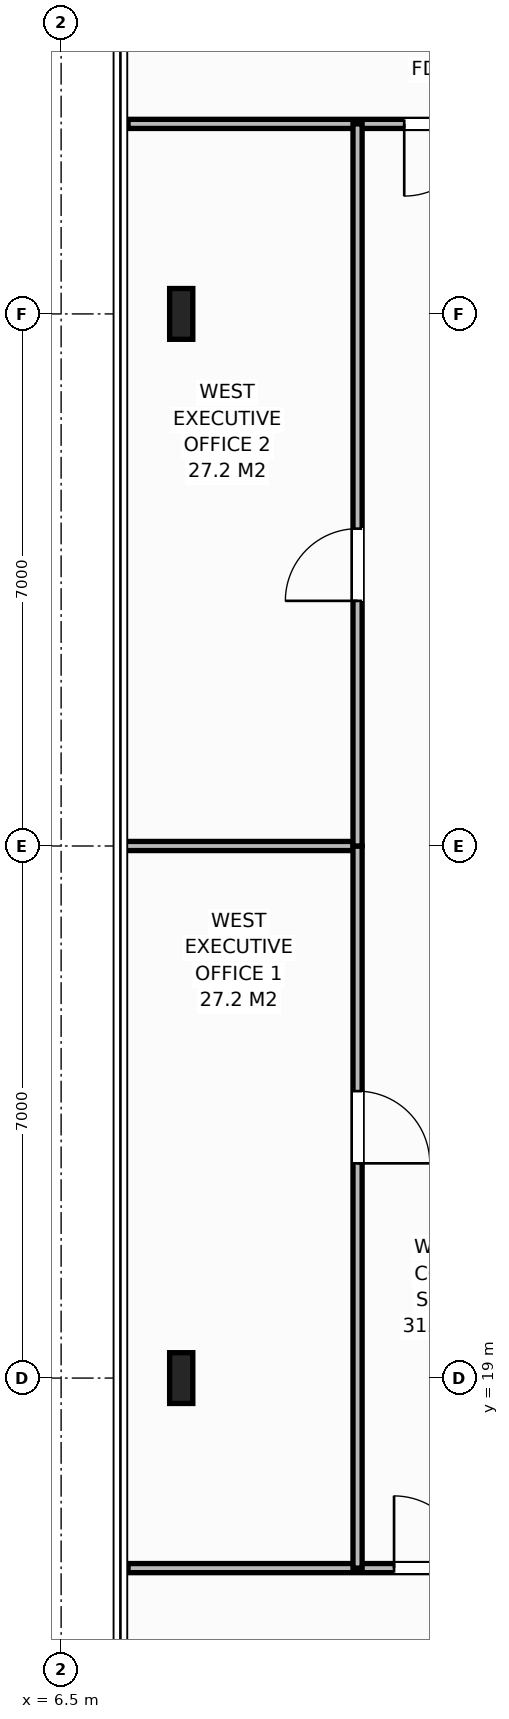
"""IFC4 building model, lengths in metres.
Left out: names, types, materials, properties, quantities, classifications, styles, units other than length and angle.
Written with IfcOpenShell. Run it as: python <this file> out.ifc"""

import sys

from ifc_helpers import new_model, si_unit, direction, frame, frame_2d, origin, origin_2d, place, context, subcontext, project, spatial, rectangle, i_section, extrude, element, fill, save


model = new_model("IFC4")
c1 = context("Model", 3, precision=1e-05, world=origin(), true_north=direction((0.0, 1.0)))
c2 = subcontext(c1, "Body", "Model", "MODEL_VIEW")
j1 = project(units=[si_unit("LENGTHUNIT", "METRE"), si_unit("PLANEANGLEUNIT", "RADIAN")], contexts=[c1])
p1 = place(None, origin())
s1 = spatial("IfcSite", under=j1, at=p1, CompositionType="ELEMENT")
p2 = place(p1, origin())
s2 = spatial("IfcBuilding", under=s1, at=p2, CompositionType="ELEMENT")
p3 = place(p2, frame((0.0, 0.0, 282.4)))
s3 = spatial("IfcBuildingStorey", under=s2, at=p3, CompositionType="ELEMENT", Elevation=282.4)
for number, where, z_axis, x_axis in (
    (1, (8.08, 19.0, 0.0), (0.0, 0.0, 1.0), (1.0, 0.0, 0.0)),
    (2, (8.08, 33.0, 0.0), (0.0, 0.0, 1.0), (1.0, 0.0, 0.0)),
):
    element("IfcColumn", number, at=place(p3, frame(where, z_axis=z_axis, x_axis=x_axis)), inside=s3, PredefinedType="COLUMN", context=c2, shape_type="SweptSolid", body=[
        extrude(i_section(OverallWidth=0.305, OverallDepth=0.668, WebThickness=0.021, FlangeThickness=0.04, at=origin_2d()), origin(), (0.0, 0.0, 1.0), 4.0),
    ])
p4 = place(p3, frame((7.38, 35.5, 0.0), z_axis=(0.0, 0.0, 1.0), x_axis=(1.0, 0.0, 0.0)))
e3 = element("IfcWall", 3, at=p4, inside=s3, PredefinedType="PARTITIONING", context=c2, shape_type="SweptSolid", body=[
    extrude(rectangle(XDim=5.198, YDim=0.12, at=frame_2d((2.599, 0.0))), origin(), (0.0, 0.0, 1.0), 3.788),
])
p5 = place(p4, frame((3.634, 0.0, 0.0)))
e4 = element("IfcOpeningElement", 4, at=p5, cuts=e3, PredefinedType="OPENING", context=c2, shape_type="SweptSolid", body=[
    extrude(rectangle(XDim=0.95, YDim=2.15, at=frame_2d((0.475, 1.075))), frame((0.0, 0.07, 0.0), z_axis=(0.0, -1.0, 0.0), x_axis=(1.0, 0.0, 0.0)), (0.0, 0.0, 1.0), 0.14),
])
p6 = place(p3, frame((7.38, 16.5, 0.0), z_axis=(0.0, 0.0, 1.0), x_axis=(1.0, 0.0, 0.0)))
e5 = element("IfcWall", 5, at=p6, inside=s3, PredefinedType="PARTITIONING", context=c2, shape_type="SweptSolid", body=[
    extrude(rectangle(XDim=7.536, YDim=0.12, at=frame_2d((3.768, 0.0))), origin(), (0.0, 0.0, 1.0), 3.788),
])
p7 = place(p6, frame((3.5, 0.0, 0.0)))
e6 = element("IfcOpeningElement", 6, at=p7, cuts=e5, PredefinedType="OPENING", context=c2, shape_type="SweptSolid", body=[
    extrude(rectangle(XDim=0.95, YDim=2.15, at=frame_2d((0.475, 1.075))), frame((0.0, 0.07, 0.0), z_axis=(0.0, -1.0, 0.0), x_axis=(1.0, 0.0, 0.0)), (0.0, 0.0, 1.0), 0.14),
])
p8 = place(p3, frame((7.22, 26.0, 0.0), z_axis=(0.0, 0.0, 1.0), x_axis=(1.0, 0.0, 0.0)))
e7 = element("IfcWall", 7, at=p8, inside=s3, PredefinedType="PARTITIONING", context=c2, shape_type="SweptSolid", body=[
    extrude(rectangle(XDim=3.18, YDim=0.12, at=frame_2d((1.59, 0.0))), origin(), (0.0, 0.0, 1.0), 3.788),
])
p9 = place(p3, frame((10.4, 16.5, 0.0), z_axis=(0.0, 0.0, 1.0), x_axis=(0.0, 1.0, 0.0)))
e8 = element("IfcWall", 8, at=p9, inside=s3, PredefinedType="PARTITIONING", context=c2, shape_type="SweptSolid", body=[
    extrude(rectangle(XDim=9.5, YDim=0.12, at=frame_2d((4.75, 0.0))), origin(), (0.0, 0.0, 1.0), 3.788),
])
p10 = place(p9, frame((5.325, 0.0, 0.0)))
e9 = element("IfcOpeningElement", 9, at=p10, cuts=e8, PredefinedType="OPENING", context=c2, shape_type="SweptSolid", body=[
    extrude(rectangle(XDim=0.95, YDim=2.15, at=frame_2d((0.475, 1.075))), frame((0.0, 0.07, 0.0), z_axis=(0.0, -1.0, 0.0), x_axis=(1.0, 0.0, 0.0)), (0.0, 0.0, 1.0), 0.14),
])
p11 = place(p3, frame((10.4, 26.0, 0.0), z_axis=(0.0, 0.0, 1.0), x_axis=(0.0, 1.0, 0.0)))
e10 = element("IfcWall", 10, at=p11, inside=s3, PredefinedType="PARTITIONING", context=c2, shape_type="SweptSolid", body=[
    extrude(rectangle(XDim=9.5, YDim=0.12, at=frame_2d((4.75, 0.0))), origin(), (0.0, 0.0, 1.0), 3.788),
])
p12 = place(p11, frame((3.225, 0.0, 0.0)))
e11 = element("IfcOpeningElement", 11, at=p12, cuts=e10, PredefinedType="OPENING", context=c2, shape_type="SweptSolid", body=[
    extrude(rectangle(XDim=0.95, YDim=2.15, at=frame_2d((0.475, 1.075))), frame((0.0, 0.07, 0.0), z_axis=(0.0, -1.0, 0.0), x_axis=(1.0, 0.0, 0.0)), (0.0, 0.0, 1.0), 0.14),
])
p13 = place(p5, origin())
e12 = element("IfcDoor", 12, at=p13, inside=s3, OperationType="SINGLE_SWING_RIGHT", PredefinedType="DOOR", context=c2, shape_type="SweptSolid", body=[
    extrude(rectangle(XDim=0.95, YDim=2.15, at=frame_2d((0.475, 1.075))), frame((0.0, 0.025, 0.0), z_axis=(0.0, -1.0, 0.0), x_axis=(1.0, 0.0, 0.0)), (0.0, 0.0, 1.0), 0.05),
])
fill(e4, e12)
p14 = place(p7, origin())
e13 = element("IfcDoor", 13, at=p14, inside=s3, OperationType="SINGLE_SWING_LEFT", PredefinedType="DOOR", context=c2, shape_type="SweptSolid", body=[
    extrude(rectangle(XDim=0.95, YDim=2.15, at=frame_2d((0.475, 1.075))), frame((0.0, 0.025, 0.0), z_axis=(0.0, -1.0, 0.0), x_axis=(1.0, 0.0, 0.0)), (0.0, 0.0, 1.0), 0.05),
])
fill(e6, e13)
p15 = place(p10, origin())
e14 = element("IfcDoor", 14, at=p15, inside=s3, OperationType="SINGLE_SWING_RIGHT", PredefinedType="DOOR", context=c2, shape_type="SweptSolid", body=[
    extrude(rectangle(XDim=0.95, YDim=2.15, at=frame_2d((0.475, 1.075))), frame((0.0, 0.025, 0.0), z_axis=(0.0, -1.0, 0.0), x_axis=(1.0, 0.0, 0.0)), (0.0, 0.0, 1.0), 0.05),
])
fill(e9, e14)
p16 = place(p12, origin())
e15 = element("IfcDoor", 15, at=p16, inside=s3, OperationType="SINGLE_SWING_LEFT", PredefinedType="DOOR", context=c2, shape_type="SweptSolid", body=[
    extrude(rectangle(XDim=0.95, YDim=2.15, at=frame_2d((0.475, 1.075))), frame((0.0, 0.025, 0.0), z_axis=(0.0, -1.0, 0.0), x_axis=(1.0, 0.0, 0.0)), (0.0, 0.0, 1.0), 0.05),
])
fill(e11, e15)
save(model, sys.argv[1])
